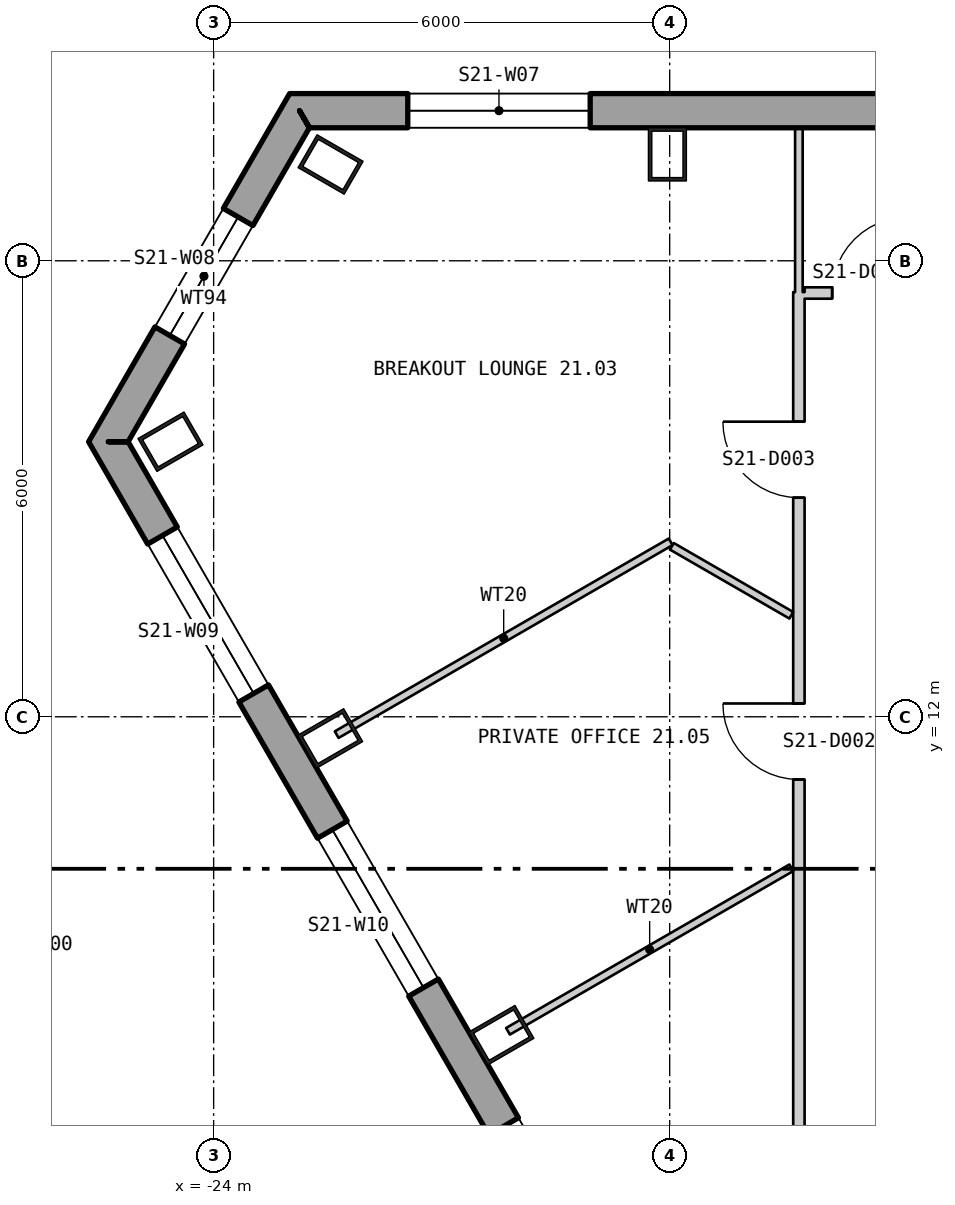
"""IFC4 building model, lengths in metres.
Left out: names, types, materials, properties, quantities, classifications, styles, units other than length and angle.
Written with IfcOpenShell. Run it as: python <this file> out.ifc"""

import sys

from ifc_helpers import new_model, si_unit, direction, frame, frame_2d, origin, origin_2d, place, context, subcontext, project, spatial, polyline, rectangle, hollow_rectangle, outline, extrude, element, fill, save


model = new_model("IFC4")
c1 = context("Model", 3, precision=1e-05, world=origin(), true_north=direction((0.0, 1.0)))
c2 = subcontext(c1, "Body", "Model", "MODEL_VIEW")
j1 = project(units=[si_unit("LENGTHUNIT", "METRE"), si_unit("PLANEANGLEUNIT", "RADIAN")], contexts=[c1])
p1 = place(None, origin())
s1 = spatial("IfcSite", under=j1, at=p1, CompositionType="ELEMENT")
p2 = place(p1, origin())
s2 = spatial("IfcBuilding", under=s1, at=p2, CompositionType="ELEMENT")
p3 = place(p2, frame((0.0, 0.0, 280.5)))
s3 = spatial("IfcBuildingStorey", under=s2, at=p3, CompositionType="ELEMENT", Elevation=280.5)
for number, where, z_axis, x_axis in (
    (1, (-18.03, 19.4, 0.0), (0.0, 0.0, 1.0), (-1.0, 0.0, 0.0)),
    (2, (-22.461, 19.267, 0.0), (0.0, 0.0, 1.0), (-0.5, -0.866, 0.0)),
    (3, (-24.568, 15.619, 0.0), (0.0, 0.0, 1.0), (0.5, -0.866, 0.0)),
    (4, (-22.467, 11.715, 0.0), (0.0, 0.0, 1.0), (0.5, -0.866, 0.0)),
    (5, (-20.214, 7.811, 0.0), (0.0, 0.0, 1.0), (0.5, -0.866, 0.0)),
):
    element("IfcColumn", number, at=place(p3, frame(where, z_axis=z_axis, x_axis=x_axis)), inside=s3, PredefinedType="COLUMN", context=c2, shape_type="SweptSolid", body=[
        extrude(hollow_rectangle(XDim=0.5, YDim=0.7, WallThickness=0.045, at=origin_2d()), origin(), (0.0, 0.0, 1.0), 3.9),
    ])
p4 = place(p3, frame((22.87, 19.975, -0.4), z_axis=(0.0, 0.0, 1.0), x_axis=(-1.0, 0.0, 0.0)))
e6 = element("IfcWall", 6, at=p4, inside=s3, PredefinedType="SOLIDWALL", context=c2, shape_type="SweptSolid", body=[
    extrude(outline(polyline([(-0.13, -0.225), (45.87, -0.225), (45.61, 0.225), (0.13, 0.225), (-0.13, -0.225)])), origin(), (0.0, 0.0, 1.0), 3.9),
])
p5 = place(p4, frame((1.424, 0.0, 1.3)))
e7 = element("IfcOpeningElement", 7, at=p5, cuts=e6, PredefinedType="OPENING", context=c2, shape_type="SweptSolid", body=[
    extrude(rectangle(XDim=2.4, YDim=2.0, at=frame_2d((1.2, 1.0))), frame((0.0, 0.235, 0.0), z_axis=(0.0, -1.0, 0.0), x_axis=(1.0, 0.0, 0.0)), (0.0, 0.0, 1.0), 0.47),
])
p6 = place(p4, frame((14.909, 0.0, 1.3)))
e8 = element("IfcOpeningElement", 8, at=p6, cuts=e6, PredefinedType="OPENING", context=c2, shape_type="SweptSolid", body=[
    extrude(rectangle(XDim=2.4, YDim=2.0, at=frame_2d((1.2, 1.0))), frame((0.0, 0.235, 0.0), z_axis=(0.0, -1.0, 0.0), x_axis=(1.0, 0.0, 0.0)), (0.0, 0.0, 1.0), 0.47),
])
p7 = place(p4, frame((19.416, 0.0, 1.3)))
e9 = element("IfcOpeningElement", 9, at=p7, cuts=e6, PredefinedType="OPENING", context=c2, shape_type="SweptSolid", body=[
    extrude(rectangle(XDim=2.4, YDim=2.0, at=frame_2d((1.2, 1.0))), frame((0.0, 0.235, 0.0), z_axis=(0.0, -1.0, 0.0), x_axis=(1.0, 0.0, 0.0)), (0.0, 0.0, 1.0), 0.47),
])
p8 = place(p4, frame((23.924, 0.0, 1.3)))
e10 = element("IfcOpeningElement", 10, at=p8, cuts=e6, PredefinedType="OPENING", context=c2, shape_type="SweptSolid", body=[
    extrude(rectangle(XDim=2.4, YDim=2.0, at=frame_2d((1.2, 1.0))), frame((0.0, 0.235, 0.0), z_axis=(0.0, -1.0, 0.0), x_axis=(1.0, 0.0, 0.0)), (0.0, 0.0, 1.0), 0.47),
])
p9 = place(p4, frame((28.431, 0.0, 1.3)))
e11 = element("IfcOpeningElement", 11, at=p9, cuts=e6, PredefinedType="OPENING", context=c2, shape_type="SweptSolid", body=[
    extrude(rectangle(XDim=2.4, YDim=2.0, at=frame_2d((1.2, 1.0))), frame((0.0, 0.235, 0.0), z_axis=(0.0, -1.0, 0.0), x_axis=(1.0, 0.0, 0.0)), (0.0, 0.0, 1.0), 0.47),
])
p10 = place(p4, frame((32.939, 0.0, 1.3)))
e12 = element("IfcOpeningElement", 12, at=p10, cuts=e6, PredefinedType="OPENING", context=c2, shape_type="SweptSolid", body=[
    extrude(rectangle(XDim=2.4, YDim=2.0, at=frame_2d((1.2, 1.0))), frame((0.0, 0.235, 0.0), z_axis=(0.0, -1.0, 0.0), x_axis=(1.0, 0.0, 0.0)), (0.0, 0.0, 1.0), 0.47),
])
p11 = place(p4, frame((41.916, 0.0, 1.3)))
e13 = element("IfcOpeningElement", 13, at=p11, cuts=e6, PredefinedType="OPENING", context=c2, shape_type="SweptSolid", body=[
    extrude(rectangle(XDim=2.4, YDim=2.0, at=frame_2d((1.2, 1.0))), frame((0.0, 0.235, 0.0), z_axis=(0.0, -1.0, 0.0), x_axis=(1.0, 0.0, 0.0)), (0.0, 0.0, 1.0), 0.47),
])
p12 = place(p3, frame((-22.87, 19.975, -0.4), z_axis=(0.0, 0.0, 1.0), x_axis=(-0.49999836324, -0.866026348766, 0.0)))
e14 = element("IfcWall", 14, at=p12, inside=s3, PredefinedType="SOLIDWALL", context=c2, shape_type="SweptSolid", body=[
    extrude(outline(polyline([(-0.13, -0.225), (5.16, -0.225), (4.9, 0.225), (0.13, 0.225), (-0.13, -0.225)])), origin(), (0.0, 0.0, 1.0), 3.9),
])
p13 = place(p12, frame((1.615, 0.0, 1.3)))
e15 = element("IfcOpeningElement", 15, at=p13, cuts=e14, PredefinedType="OPENING", context=c2, shape_type="SweptSolid", body=[
    extrude(rectangle(XDim=1.8, YDim=2.0, at=frame_2d((0.9, 1.0))), frame((0.0, 0.235, 0.0), z_axis=(0.0, -1.0, 0.0), x_axis=(1.0, 0.0, 0.0)), (0.0, 0.0, 1.0), 0.47),
])
p14 = place(p3, frame((-25.385, 15.619, -0.18), z_axis=(0.0, 0.0, 1.0), x_axis=(0.500000711659, -0.866024992908, 0.0)))
e16 = element("IfcWall", 16, at=p14, inside=s3, PredefinedType="SOLIDWALL", context=c2, shape_type="SweptSolid", body=[
    extrude(outline(polyline([(-0.13, -0.225), (45.87, -0.225), (45.61, 0.225), (0.13, 0.225), (-0.13, -0.225)])), origin(), (0.0, 0.0, 1.0), 3.68),
])
p15 = place(p14, frame((1.424, 0.0, 1.08)))
e17 = element("IfcOpeningElement", 17, at=p15, cuts=e16, PredefinedType="OPENING", context=c2, shape_type="SweptSolid", body=[
    extrude(rectangle(XDim=2.4, YDim=2.0, at=frame_2d((1.2, 1.0))), frame((0.0, 0.235, 0.0), z_axis=(0.0, -1.0, 0.0), x_axis=(1.0, 0.0, 0.0)), (0.0, 0.0, 1.0), 0.47),
])
p16 = place(p14, frame((5.893, 0.0, 1.08)))
e18 = element("IfcOpeningElement", 18, at=p16, cuts=e16, PredefinedType="OPENING", context=c2, shape_type="SweptSolid", body=[
    extrude(rectangle(XDim=2.4, YDim=2.0, at=frame_2d((1.2, 1.0))), frame((0.0, 0.235, 0.0), z_axis=(0.0, -1.0, 0.0), x_axis=(1.0, 0.0, 0.0)), (0.0, 0.0, 1.0), 0.47),
])
p17 = place(p14, frame((10.401, 0.0, 1.08)))
e19 = element("IfcOpeningElement", 19, at=p17, cuts=e16, PredefinedType="OPENING", context=c2, shape_type="SweptSolid", body=[
    extrude(rectangle(XDim=2.4, YDim=2.0, at=frame_2d((1.2, 1.0))), frame((0.0, 0.235, 0.0), z_axis=(0.0, -1.0, 0.0), x_axis=(1.0, 0.0, 0.0)), (0.0, 0.0, 1.0), 0.47),
])
p18 = place(p14, frame((14.909, 0.0, 1.08)))
e20 = element("IfcOpeningElement", 20, at=p18, cuts=e16, PredefinedType="OPENING", context=c2, shape_type="SweptSolid", body=[
    extrude(rectangle(XDim=2.4, YDim=2.0, at=frame_2d((1.2, 1.0))), frame((0.0, 0.235, 0.0), z_axis=(0.0, -1.0, 0.0), x_axis=(1.0, 0.0, 0.0)), (0.0, 0.0, 1.0), 0.47),
])
p19 = place(p14, frame((19.416, 0.0, 1.08)))
e21 = element("IfcOpeningElement", 21, at=p19, cuts=e16, PredefinedType="OPENING", context=c2, shape_type="SweptSolid", body=[
    extrude(rectangle(XDim=2.4, YDim=2.0, at=frame_2d((1.2, 1.0))), frame((0.0, 0.235, 0.0), z_axis=(0.0, -1.0, 0.0), x_axis=(1.0, 0.0, 0.0)), (0.0, 0.0, 1.0), 0.47),
])
p20 = place(p14, frame((23.924, 0.0, 1.08)))
e22 = element("IfcOpeningElement", 22, at=p20, cuts=e16, PredefinedType="OPENING", context=c2, shape_type="SweptSolid", body=[
    extrude(rectangle(XDim=2.4, YDim=2.0, at=frame_2d((1.2, 1.0))), frame((0.0, 0.235, 0.0), z_axis=(0.0, -1.0, 0.0), x_axis=(1.0, 0.0, 0.0)), (0.0, 0.0, 1.0), 0.47),
])
p21 = place(p14, frame((28.431, 0.0, 1.08)))
e23 = element("IfcOpeningElement", 23, at=p21, cuts=e16, PredefinedType="OPENING", context=c2, shape_type="SweptSolid", body=[
    extrude(rectangle(XDim=2.4, YDim=2.0, at=frame_2d((1.2, 1.0))), frame((0.0, 0.235, 0.0), z_axis=(0.0, -1.0, 0.0), x_axis=(1.0, 0.0, 0.0)), (0.0, 0.0, 1.0), 0.47),
])
p22 = place(p14, frame((32.939, 0.0, 1.08)))
e24 = element("IfcOpeningElement", 24, at=p22, cuts=e16, PredefinedType="OPENING", context=c2, shape_type="SweptSolid", body=[
    extrude(rectangle(XDim=2.4, YDim=2.0, at=frame_2d((1.2, 1.0))), frame((0.0, 0.235, 0.0), z_axis=(0.0, -1.0, 0.0), x_axis=(1.0, 0.0, 0.0)), (0.0, 0.0, 1.0), 0.47),
])
p23 = place(p14, frame((37.447, 0.0, 1.08)))
e25 = element("IfcOpeningElement", 25, at=p23, cuts=e16, PredefinedType="OPENING", context=c2, shape_type="SweptSolid", body=[
    extrude(rectangle(XDim=2.4, YDim=2.0, at=frame_2d((1.2, 1.0))), frame((0.0, 0.235, 0.0), z_axis=(0.0, -1.0, 0.0), x_axis=(1.0, 0.0, 0.0)), (0.0, 0.0, 1.0), 0.47),
])
p24 = place(p14, frame((41.916, 0.0, 1.08)))
e26 = element("IfcOpeningElement", 26, at=p24, cuts=e16, PredefinedType="OPENING", context=c2, shape_type="SweptSolid", body=[
    extrude(rectangle(XDim=2.4, YDim=2.0, at=frame_2d((1.2, 1.0))), frame((0.0, 0.235, 0.0), z_axis=(0.0, -1.0, 0.0), x_axis=(1.0, 0.0, 0.0)), (0.0, 0.0, 1.0), 0.47),
])
p25 = place(p3, frame((-22.381, 11.765, 0.0), z_axis=(0.0, 0.0, 1.0), x_axis=(0.86601491352, 0.500018169231, 0.0)))
e27 = element("IfcWall", 27, at=p25, inside=s3, PredefinedType="PARTITIONING", context=c2, shape_type="SweptSolid", body=[
    extrude(rectangle(XDim=5.074, YDim=0.1, at=frame_2d((2.537, 0.0))), origin(), (0.0, 0.0, 1.0), 3.7),
])
p26 = place(p3, frame((-20.127, 7.862, 0.0), z_axis=(0.0, 0.0, 1.0), x_axis=(0.866104329613, 0.499863271531, 0.0)))
e28 = element("IfcWall", 28, at=p26, inside=s3, PredefinedType="PARTITIONING", context=c2, shape_type="SweptSolid", body=[
    extrude(rectangle(XDim=4.303, YDim=0.1, at=frame_2d((2.152, 0.0))), origin(), (0.0, 0.0, 1.0), 3.7),
])
p27 = place(p3, frame((-17.971, 14.243, 0.0), z_axis=(0.0, 0.0, 1.0), x_axis=(0.86602952684, -0.49999285859, 0.0)))
e29 = element("IfcWall", 29, at=p27, inside=s3, PredefinedType="PARTITIONING", context=c2, shape_type="SweptSolid", body=[
    extrude(rectangle(XDim=1.814, YDim=0.1, at=frame_2d((0.907, 0.0))), origin(), (0.0, 0.0, 1.0), 3.7),
])
p28 = place(p3, frame((-16.3, 2.125, 0.0), z_axis=(0.0, 0.0, 1.0), x_axis=(0.0, 1.0, 0.0)))
e30 = element("IfcWall", 30, at=p28, inside=s3, PredefinedType="PARTITIONING", context=c2, shape_type="SweptSolid", body=[
    extrude(rectangle(XDim=15.463, YDim=0.15, at=frame_2d((7.731, 0.0))), origin(), (0.0, 0.0, 1.0), 3.7),
])
p29 = place(p28, frame((3.385, 0.0, 0.0)))
e31 = element("IfcOpeningElement", 31, at=p29, cuts=e30, PredefinedType="OPENING", context=c2, shape_type="SweptSolid", body=[
    extrude(rectangle(XDim=1.0, YDim=2.1, at=frame_2d((0.5, 1.05))), frame((0.0, 0.085, 0.0), z_axis=(0.0, -1.0, 0.0), x_axis=(1.0, 0.0, 0.0)), (0.0, 0.0, 1.0), 0.17),
])
p30 = place(p28, frame((9.05, 0.0, 0.0)))
e32 = element("IfcOpeningElement", 32, at=p30, cuts=e30, PredefinedType="OPENING", context=c2, shape_type="SweptSolid", body=[
    extrude(rectangle(XDim=1.0, YDim=2.1, at=frame_2d((0.5, 1.05))), frame((0.0, 0.085, 0.0), z_axis=(0.0, -1.0, 0.0), x_axis=(1.0, 0.0, 0.0)), (0.0, 0.0, 1.0), 0.17),
])
p31 = place(p28, frame((12.758, 0.0, 0.0)))
e33 = element("IfcOpeningElement", 33, at=p31, cuts=e30, PredefinedType="OPENING", context=c2, shape_type="SweptSolid", body=[
    extrude(rectangle(XDim=1.0, YDim=2.1, at=frame_2d((0.5, 1.05))), frame((0.0, 0.085, 0.0), z_axis=(0.0, -1.0, 0.0), x_axis=(1.0, 0.0, 0.0)), (0.0, 0.0, 1.0), 0.17),
])
p32 = place(p3, frame((-16.3, 17.588, 0.0), z_axis=(0.0, 0.0, 1.0), x_axis=(0.0, 1.0, 0.0)))
e34 = element("IfcWall", 34, at=p32, inside=s3, PredefinedType="PARTITIONING", context=c2, shape_type="SweptSolid", body=[
    extrude(rectangle(XDim=2.162, YDim=0.1, at=frame_2d((1.081, 0.0))), origin(), (0.0, 0.0, 1.0), 3.7),
])
p33 = place(p3, frame((-16.225, 17.576, 0.0), z_axis=(0.0, 0.0, 1.0), x_axis=(1.0, 0.0, 0.0)))
e35 = element("IfcWall", 35, at=p33, inside=s3, PredefinedType="PARTITIONING", context=c2, shape_type="SweptSolid", body=[
    extrude(rectangle(XDim=1.725, YDim=0.15, at=frame_2d((0.863, 0.0))), origin(), (0.0, 0.0, 1.0), 3.7),
])
p34 = place(p33, frame((0.363, 0.0, 0.0)))
e36 = element("IfcOpeningElement", 36, at=p34, cuts=e35, PredefinedType="OPENING", context=c2, shape_type="SweptSolid", body=[
    extrude(rectangle(XDim=1.0, YDim=2.1, at=frame_2d((0.5, 1.05))), frame((0.0, 0.085, 0.0), z_axis=(0.0, -1.0, 0.0), x_axis=(1.0, 0.0, 0.0)), (0.0, 0.0, 1.0), 0.17),
])
p35 = place(p11, origin())
e37 = element("IfcWindow", 37, at=p35, inside=s3, PartitioningType="SINGLE_PANEL", PredefinedType="WINDOW", context=c2, shape_type="SweptSolid", body=[
    extrude(rectangle(XDim=2.4, YDim=2.0, at=frame_2d((1.2, 1.0))), frame((0.0, 0.105, 0.0), z_axis=(0.0, -1.0, 0.0), x_axis=(1.0, 0.0, 0.0)), (0.0, 0.0, 1.0), 0.06),
])
fill(e13, e37)
p36 = place(p13, origin())
e38 = element("IfcWindow", 38, at=p36, inside=s3, PartitioningType="SINGLE_PANEL", PredefinedType="WINDOW", context=c2, shape_type="SweptSolid", body=[
    extrude(rectangle(XDim=1.8, YDim=2.0, at=frame_2d((0.9, 1.0))), frame((0.0, 0.105, 0.0), z_axis=(0.0, -1.0, 0.0), x_axis=(1.0, 0.0, 0.0)), (0.0, 0.0, 1.0), 0.06),
])
fill(e15, e38)
p37 = place(p15, origin())
e39 = element("IfcWindow", 39, at=p37, inside=s3, PartitioningType="SINGLE_PANEL", PredefinedType="WINDOW", context=c2, shape_type="SweptSolid", body=[
    extrude(rectangle(XDim=2.4, YDim=2.0, at=frame_2d((1.2, 1.0))), frame((0.0, 0.105, 0.0), z_axis=(0.0, -1.0, 0.0), x_axis=(1.0, 0.0, 0.0)), (0.0, 0.0, 1.0), 0.06),
])
fill(e17, e39)
p38 = place(p16, origin())
e40 = element("IfcWindow", 40, at=p38, inside=s3, PartitioningType="SINGLE_PANEL", PredefinedType="WINDOW", context=c2, shape_type="SweptSolid", body=[
    extrude(rectangle(XDim=2.4, YDim=2.0, at=frame_2d((1.2, 1.0))), frame((0.0, 0.105, 0.0), z_axis=(0.0, -1.0, 0.0), x_axis=(1.0, 0.0, 0.0)), (0.0, 0.0, 1.0), 0.06),
])
fill(e18, e40)
p39 = place(p17, origin())
e41 = element("IfcWindow", 41, at=p39, inside=s3, PartitioningType="SINGLE_PANEL", PredefinedType="WINDOW", context=c2, shape_type="SweptSolid", body=[
    extrude(rectangle(XDim=2.4, YDim=2.0, at=frame_2d((1.2, 1.0))), frame((0.0, 0.105, 0.0), z_axis=(0.0, -1.0, 0.0), x_axis=(1.0, 0.0, 0.0)), (0.0, 0.0, 1.0), 0.06),
])
fill(e19, e41)
p40 = place(p30, origin())
e42 = element("IfcDoor", 42, at=p40, inside=s3, OperationType="SINGLE_SWING_LEFT", PredefinedType="DOOR", context=c2, shape_type="SweptSolid", body=[
    extrude(rectangle(XDim=1.0, YDim=2.1, at=frame_2d((0.5, 1.05))), frame((0.0, 0.025, 0.0), z_axis=(0.0, -1.0, 0.0), x_axis=(1.0, 0.0, 0.0)), (0.0, 0.0, 1.0), 0.05),
])
fill(e32, e42)
p41 = place(p31, origin())
e43 = element("IfcDoor", 43, at=p41, inside=s3, OperationType="SINGLE_SWING_LEFT", PredefinedType="DOOR", context=c2, shape_type="SweptSolid", body=[
    extrude(rectangle(XDim=1.0, YDim=2.1, at=frame_2d((0.5, 1.05))), frame((0.0, 0.025, 0.0), z_axis=(0.0, -1.0, 0.0), x_axis=(1.0, 0.0, 0.0)), (0.0, 0.0, 1.0), 0.05),
])
fill(e33, e43)
p42 = place(p34, origin())
e44 = element("IfcDoor", 44, at=p42, inside=s3, OperationType="SINGLE_SWING_LEFT", PredefinedType="DOOR", context=c2, shape_type="SweptSolid", body=[
    extrude(rectangle(XDim=1.0, YDim=2.1, at=frame_2d((0.5, 1.05))), frame((0.0, 0.025, 0.0), z_axis=(0.0, -1.0, 0.0), x_axis=(1.0, 0.0, 0.0)), (0.0, 0.0, 1.0), 0.05),
])
fill(e36, e44)
save(model, sys.argv[1])
